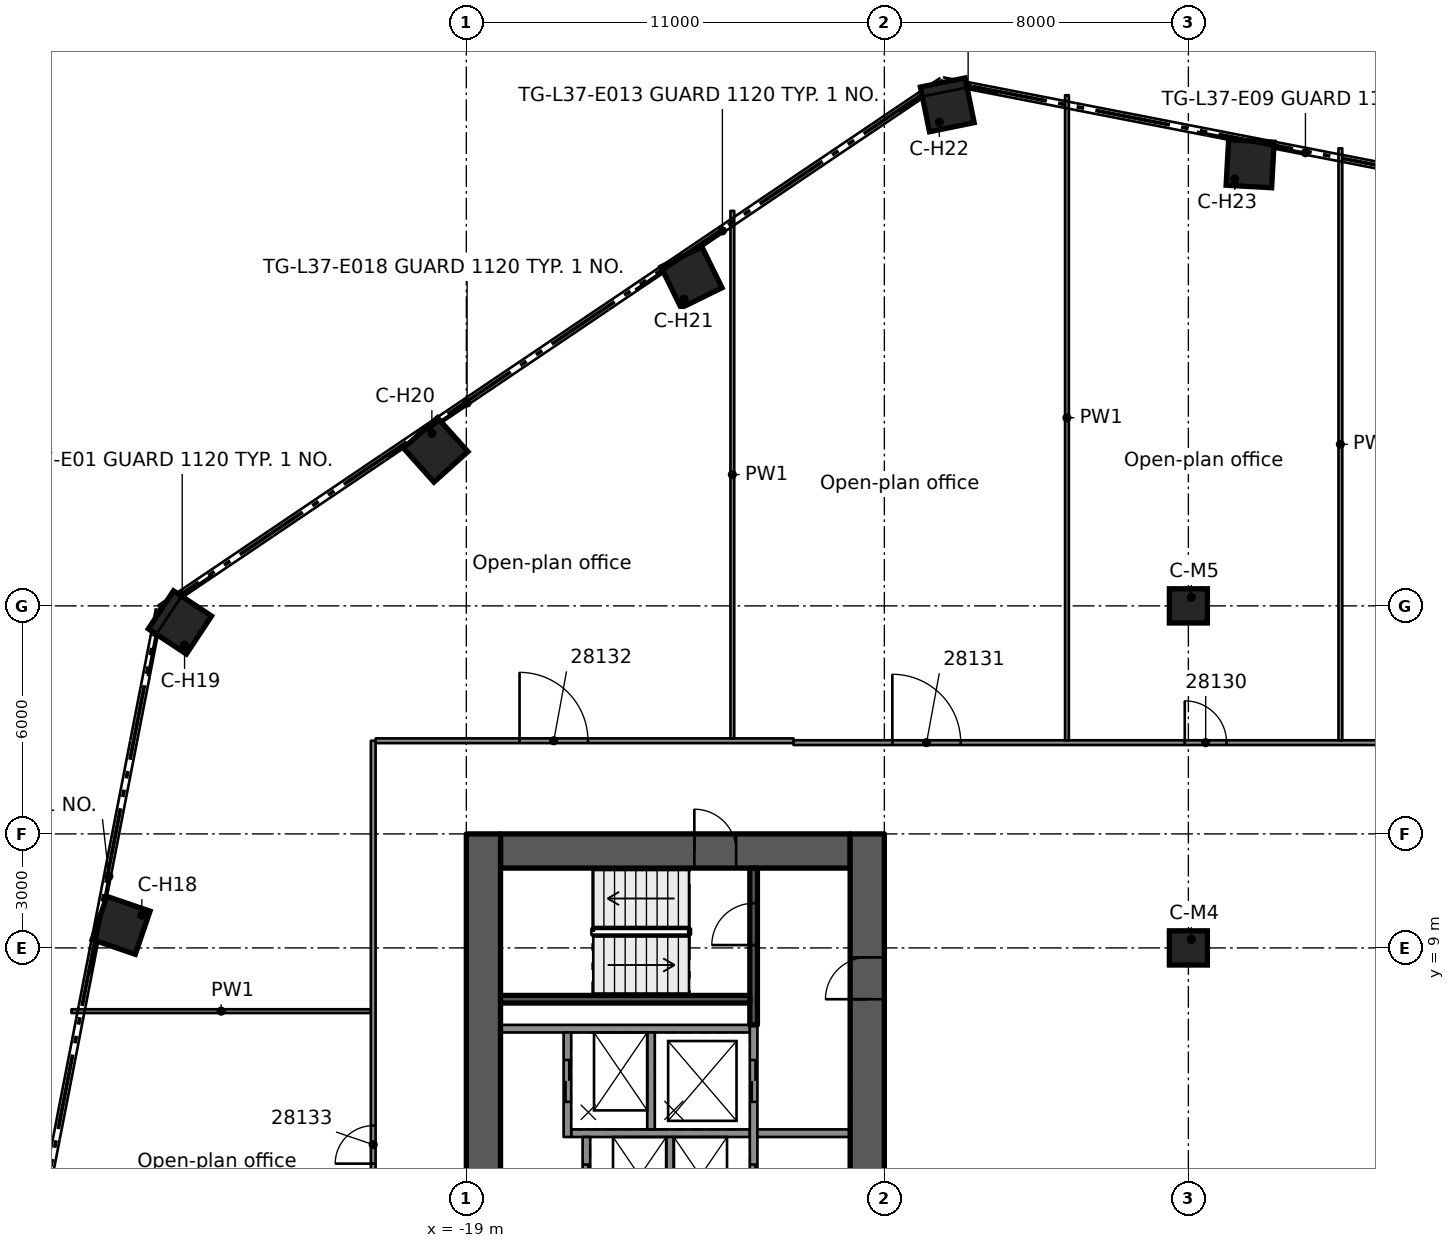
"""IFC4 building model, lengths in metres.
Left out: names, types, materials, properties, quantities, classifications, styles, units other than length and angle.
Written with IfcOpenShell. Run it as: python <this file> out.ifc"""

import sys

from ifc_helpers import new_model, si_unit, direction, frame, frame_2d, origin, origin_2d, place, context, subcontext, project, spatial, rectangle, extrude, element, fill, save


model = new_model("IFC4")
c1 = context("Model", 3, precision=1e-05, world=origin(), true_north=direction((0.0, 1.0)))
c2 = subcontext(c1, "Body", "Model", "MODEL_VIEW")
j1 = project(units=[si_unit("LENGTHUNIT", "METRE"), si_unit("PLANEANGLEUNIT", "RADIAN")], contexts=[c1])
p1 = place(None, origin())
s1 = spatial("IfcSite", under=j1, at=p1, CompositionType="ELEMENT")
p2 = place(p1, origin())
s2 = spatial("IfcBuilding", under=s1, at=p2, CompositionType="ELEMENT")
p3 = place(p2, frame((0.0, 0.0, 145.6)))
s3 = spatial("IfcBuildingStorey", under=s2, at=p3, CompositionType="ELEMENT", Elevation=145.6)
p4 = place(p3, frame((-18.1, 11.55, 0.0), z_axis=(0.0, 0.0, 1.0), x_axis=(1.0, 0.0, 0.0)))
e1 = element("IfcWall", 1, at=p4, inside=s3, PredefinedType="SHEAR", context=c2, shape_type="SweptSolid", body=[
    extrude(rectangle(XDim=9.2, YDim=0.9, at=frame_2d((4.6, 0.0))), origin(), (0.0, 0.0, 1.0), 3.5),
])
p5 = place(p4, frame((5.1, 0.0, 0.0)))
e2 = element("IfcOpeningElement", 2, at=p5, cuts=e1, PredefinedType="OPENING", context=c2, shape_type="SweptSolid", body=[
    extrude(rectangle(XDim=1.1, YDim=2.1, at=frame_2d((0.55, 1.05))), frame((0.0, 0.46, 0.0), z_axis=(0.0, -1.0, 0.0), x_axis=(1.0, 0.0, 0.0)), (0.0, 0.0, 1.0), 0.92),
])
p6 = place(p3, frame((-18.55, -12.0, 0.0), z_axis=(0.0, 0.0, 1.0), x_axis=(0.0, 1.0, 0.0)))
e3 = element("IfcWall", 3, at=p6, inside=s3, PredefinedType="SHEAR", context=c2, shape_type="SweptSolid", body=[
    extrude(rectangle(XDim=24.0, YDim=0.9, at=frame_2d((12.0, 0.0))), origin(), (0.0, 0.0, 1.0), 3.5),
])
p7 = place(p6, frame((10.1, 0.0, 0.0)))
e4 = element("IfcOpeningElement", 4, at=p7, cuts=e3, PredefinedType="OPENING", context=c2, shape_type="SweptSolid", body=[
    extrude(rectangle(XDim=1.8, YDim=2.1, at=frame_2d((0.9, 1.05))), frame((0.0, 0.46, 0.0), z_axis=(0.0, -1.0, 0.0), x_axis=(1.0, 0.0, 0.0)), (0.0, 0.0, 1.0), 0.92),
])
p8 = place(p3, frame((-8.45, -12.0, 0.0), z_axis=(0.0, 0.0, 1.0), x_axis=(0.0, 1.0, 0.0)))
e5 = element("IfcWall", 5, at=p8, inside=s3, PredefinedType="SHEAR", context=c2, shape_type="SweptSolid", body=[
    extrude(rectangle(XDim=24.0, YDim=0.9, at=frame_2d((12.0, 0.0))), origin(), (0.0, 0.0, 1.0), 3.5),
])
p9 = place(p8, frame((9.6, 0.0, 0.0)))
e6 = element("IfcOpeningElement", 6, at=p9, cuts=e5, PredefinedType="OPENING", context=c2, shape_type="SweptSolid", body=[
    extrude(rectangle(XDim=1.8, YDim=2.1, at=frame_2d((0.9, 1.05))), frame((0.0, 0.46, 0.0), z_axis=(0.0, -1.0, 0.0), x_axis=(1.0, 0.0, 0.0)), (0.0, 0.0, 1.0), 0.92),
])
p10 = place(p8, frame((19.65, 0.0, 0.0)))
e7 = element("IfcOpeningElement", 7, at=p10, cuts=e5, PredefinedType="OPENING", context=c2, shape_type="SweptSolid", body=[
    extrude(rectangle(XDim=1.1, YDim=2.1, at=frame_2d((0.55, 1.05))), frame((0.0, 0.46, 0.0), z_axis=(0.0, -1.0, 0.0), x_axis=(1.0, 0.0, 0.0)), (0.0, 0.0, 1.0), 0.92),
])
for number, where, z_axis, x_axis in (
    (8, (-28.085, 9.594, 0.0), (0.0, 0.0, 1.0), (-0.946, 0.323, 0.0)),
    (9, (-26.536, 17.564, 0.0), (0.0, 0.0, 1.0), (-0.834, 0.552, 0.0)),
    (10, (-19.806, 22.104, 0.0), (0.0, 0.0, 1.0), (-0.667, 0.745, 0.0)),
    (11, (-13.075, 26.644, 0.0), (0.0, 0.0, 1.0), (-0.441, 0.898, 0.0)),
    (12, (-6.344, 31.183, 0.0), (0.0, 0.0, 1.0), (-0.199, 0.98, 0.0)),
    (13, (1.625, 29.634, 0.0), (0.0, 0.0, 1.0), (0.055, 0.998, 0.0)),
):
    element("IfcColumn", number, at=place(p3, frame(where, z_axis=z_axis, x_axis=x_axis)), inside=s3, PredefinedType="COLUMN", context=c2, shape_type="SweptSolid", body=[
        extrude(rectangle(XDim=1.2, YDim=1.2, at=origin_2d()), origin(), (0.0, 0.0, 1.0), 3.5),
    ])
for number, where, z_axis, x_axis in (
    (14, (0.0, 9.0, 0.0), (0.0, 0.0, 1.0), (1.0, 0.0, 0.0)),
    (15, (0.0, 18.0, 0.0), (0.0, 0.0, 1.0), (1.0, 0.0, 0.0)),
):
    element("IfcColumn", number, at=place(p3, frame(where, z_axis=z_axis, x_axis=x_axis)), inside=s3, PredefinedType="COLUMN", context=c2, shape_type="SweptSolid", body=[
        extrude(rectangle(XDim=1.0, YDim=0.9, at=origin_2d()), origin(), (0.0, 0.0, 1.0), 3.5),
    ])
p11 = place(p3, frame((-11.54, 6.875, 0.0), z_axis=(0.0, 0.0, 1.0), x_axis=(-1.0, 0.0, 0.0)))
e16 = element("IfcWall", 16, at=p11, inside=s3, PredefinedType="SOLIDWALL", context=c2, shape_type="SweptSolid", body=[
    extrude(rectangle(XDim=6.56, YDim=0.2, at=frame_2d((3.28, 0.0))), origin(), (0.0, 0.0, 1.0), 3.09),
])
p12 = place(p3, frame((-11.54, 4.125, 0.0), z_axis=(0.0, 0.0, 1.0), x_axis=(-1.0, 0.0, 0.0)))
e17 = element("IfcWall", 17, at=p12, inside=s3, PredefinedType="SOLIDWALL", context=c2, shape_type="SweptSolid", body=[
    extrude(rectangle(XDim=4.7, YDim=0.2, at=frame_2d((2.35, 0.0))), origin(), (0.0, 0.0, 1.0), 3.09),
])
p13 = place(p3, frame((-11.44, -6.975, 0.0), z_axis=(0.0, 0.0, 1.0), x_axis=(0.0, 1.0, 0.0)))
e18 = element("IfcWall", 18, at=p13, inside=s3, PredefinedType="SOLIDWALL", context=c2, shape_type="SweptSolid", body=[
    extrude(rectangle(XDim=13.95, YDim=0.2, at=frame_2d((6.975, 0.0))), origin(), (0.0, 0.0, 1.0), 3.09),
])
p14 = place(p13, frame((9.175, 0.0, 0.0)))
e19 = element("IfcOpeningElement", 19, at=p14, cuts=e18, PredefinedType="OPENING", context=c2, shape_type="SweptSolid", body=[
    extrude(rectangle(XDim=1.1, YDim=2.1, at=frame_2d((0.55, 1.05))), frame((0.0, 0.11, 0.0), z_axis=(0.0, -1.0, 0.0), x_axis=(1.0, 0.0, 0.0)), (0.0, 0.0, 1.0), 0.22),
])
p15 = place(p13, frame((11.925, 0.0, 0.0)))
e20 = element("IfcOpeningElement", 20, at=p15, cuts=e18, PredefinedType="OPENING", context=c2, shape_type="SweptSolid", body=[
    extrude(rectangle(XDim=1.1, YDim=2.1, at=frame_2d((0.55, 1.05))), frame((0.0, 0.11, 0.0), z_axis=(0.0, -1.0, 0.0), x_axis=(1.0, 0.0, 0.0)), (0.0, 0.0, 1.0), 0.22),
])
p16 = place(p13, frame((1.075, 0.0, 0.0)))
e21 = element("IfcOpeningElement", 21, at=p16, cuts=e18, PredefinedType="OPENING", context=c2, shape_type="SweptSolid", body=[
    extrude(rectangle(XDim=0.8, YDim=2.1, at=frame_2d((0.4, 1.05))), frame((0.0, 0.11, 0.0), z_axis=(0.0, -1.0, 0.0), x_axis=(1.0, 0.0, 0.0)), (0.0, 0.0, 1.0), 0.22),
])
for number, where, z_axis, x_axis in (
    (22, (-13.64, 1.475, 0.0), (0.0, 0.0, 1.0), (0.0, 1.0, 0.0)),
    (23, (-14.14, 4.225, 0.0), (0.0, 0.0, 1.0), (0.0, 1.0, 0.0)),
):
    element("IfcWall", number, at=place(p3, frame(where, z_axis=z_axis, x_axis=x_axis)), inside=s3, PredefinedType="SOLIDWALL", context=c2, shape_type="SweptSolid", body=[
        extrude(rectangle(XDim=2.55, YDim=0.2, at=frame_2d((1.275, 0.0))), origin(), (0.0, 0.0, 1.0), 3.09),
    ])
p17 = place(p3, frame((-15.84, -4.025, 0.0), z_axis=(0.0, 0.0, 1.0), x_axis=(0.0, 1.0, 0.0)))
e24 = element("IfcWall", 24, at=p17, inside=s3, PredefinedType="SOLIDWALL", context=c2, shape_type="SweptSolid", body=[
    extrude(rectangle(XDim=8.05, YDim=0.2, at=frame_2d((4.025, 0.0))), origin(), (0.0, 0.0, 1.0), 3.09),
])
p18 = place(p17, frame((3.475, 0.0, 0.0)))
e25 = element("IfcOpeningElement", 25, at=p18, cuts=e24, PredefinedType="OPENING", context=c2, shape_type="SweptSolid", body=[
    extrude(rectangle(XDim=1.1, YDim=2.1, at=frame_2d((0.55, 1.05))), frame((0.0, 0.11, 0.0), z_axis=(0.0, -1.0, 0.0), x_axis=(1.0, 0.0, 0.0)), (0.0, 0.0, 1.0), 0.22),
])
p19 = place(p17, frame((6.225, 0.0, 0.0)))
e26 = element("IfcOpeningElement", 26, at=p19, cuts=e24, PredefinedType="OPENING", context=c2, shape_type="SweptSolid", body=[
    extrude(rectangle(XDim=1.1, YDim=2.1, at=frame_2d((0.55, 1.05))), frame((0.0, 0.11, 0.0), z_axis=(0.0, -1.0, 0.0), x_axis=(1.0, 0.0, 0.0)), (0.0, 0.0, 1.0), 0.22),
])
p20 = place(p3, frame((-16.34, 4.025, 0.0), z_axis=(0.0, 0.0, 1.0), x_axis=(0.0, 1.0, 0.0)))
e27 = element("IfcWall", 27, at=p20, inside=s3, PredefinedType="SOLIDWALL", context=c2, shape_type="SweptSolid", body=[
    extrude(rectangle(XDim=2.75, YDim=0.2, at=frame_2d((1.375, 0.0))), origin(), (0.0, 0.0, 1.0), 3.09),
])
p21 = place(p20, frame((0.925, 0.0, 0.0)))
e28 = element("IfcOpeningElement", 28, at=p21, cuts=e27, PredefinedType="OPENING", context=c2, shape_type="SweptSolid", body=[
    extrude(rectangle(XDim=1.1, YDim=2.1, at=frame_2d((0.55, 1.05))), frame((0.0, 0.11, 0.0), z_axis=(0.0, -1.0, 0.0), x_axis=(1.0, 0.0, 0.0)), (0.0, 0.0, 1.0), 0.22),
])
p22 = place(p3, frame((-11.44, 6.975, 0.0), z_axis=(0.0, 0.0, 1.0), x_axis=(0.0, 1.0, 0.0)))
e29 = element("IfcWall", 29, at=p22, inside=s3, PredefinedType="SOLIDWALL", context=c2, shape_type="SweptSolid", body=[
    extrude(rectangle(XDim=4.125, YDim=0.2, at=frame_2d((2.062, 0.0))), origin(), (0.0, 0.0, 1.0), 3.09),
])
p23 = place(p22, frame((2.1, 0.0, 0.0)))
e30 = element("IfcOpeningElement", 30, at=p23, cuts=e29, PredefinedType="OPENING", context=c2, shape_type="SweptSolid", body=[
    extrude(rectangle(XDim=1.1, YDim=2.1, at=frame_2d((0.55, 1.05))), frame((0.0, 0.11, 0.0), z_axis=(0.0, -1.0, 0.0), x_axis=(1.0, 0.0, 0.0)), (0.0, 0.0, 1.0), 0.22),
])
p24 = place(p3, frame((-11.54, 7.65, 0.0), z_axis=(0.0, 0.0, 1.0), x_axis=(-1.0, 0.0, 0.0)))
e31 = element("IfcWall", 31, at=p24, inside=s3, PredefinedType="SOLIDWALL", context=c2, shape_type="SweptSolid", body=[
    extrude(rectangle(XDim=6.56, YDim=0.2, at=frame_2d((3.28, 0.0))), origin(), (0.0, 0.0, 1.0), 3.09),
])
p25 = place(p3, frame((-8.9, 4.125, 0.0), z_axis=(0.0, 0.0, 1.0), x_axis=(-1.0, 0.0, 0.0)))
e32 = element("IfcWall", 32, at=p25, inside=s3, PredefinedType="PARTITIONING", context=c2, shape_type="SweptSolid", body=[
    extrude(rectangle(XDim=2.44, YDim=0.2, at=frame_2d((1.22, 0.0))), origin(), (0.0, 0.0, 1.0), 3.09),
])
p26 = place(p3, frame((-29.39, 7.336, 0.0), z_axis=(0.0, 0.0, 1.0), x_axis=(1.0, 0.0, 0.0)))
e33 = element("IfcWall", 33, at=p26, inside=s3, PredefinedType="PARTITIONING", context=c2, shape_type="SweptSolid", body=[
    extrude(rectangle(XDim=7.878, YDim=0.1, at=frame_2d((3.939, 0.0))), origin(), (0.0, 0.0, 1.0), 3.08),
])
p27 = place(p3, frame((-10.39, 14.401, 0.0), z_axis=(0.0, 0.0, 1.0), x_axis=(1.0, 0.0, 0.0)))
e34 = element("IfcWall", 34, at=p27, inside=s3, PredefinedType="PARTITIONING", context=c2, shape_type="SweptSolid", body=[
    extrude(rectangle(XDim=20.781, YDim=0.125, at=frame_2d((10.391, 0.0))), origin(), (0.0, 0.0, 1.0), 3.08),
])
p28 = place(p27, frame((10.295, 0.0, 0.0)))
e35 = element("IfcOpeningElement", 35, at=p28, cuts=e34, PredefinedType="OPENING", context=c2, shape_type="SweptSolid", body=[
    extrude(rectangle(XDim=1.1, YDim=2.1, at=frame_2d((0.55, 1.05))), frame((0.0, 0.073, 0.0), z_axis=(0.0, -1.0, 0.0), x_axis=(1.0, 0.0, 0.0)), (0.0, 0.0, 1.0), 0.145),
])
p29 = place(p27, frame((2.6, 0.0, 0.0)))
e36 = element("IfcOpeningElement", 36, at=p29, cuts=e34, PredefinedType="OPENING", context=c2, shape_type="SweptSolid", body=[
    extrude(rectangle(XDim=1.8, YDim=2.1, at=frame_2d((0.9, 1.05))), frame((0.0, 0.073, 0.0), z_axis=(0.0, -1.0, 0.0), x_axis=(1.0, 0.0, 0.0)), (0.0, 0.0, 1.0), 0.145),
])
p30 = place(p3, frame((-21.387, 14.451, 0.0), z_axis=(0.0, 0.0, 1.0), x_axis=(1.0, 0.0, 0.0)))
e37 = element("IfcWall", 37, at=p30, inside=s3, PredefinedType="PARTITIONING", context=c2, shape_type="SweptSolid", body=[
    extrude(rectangle(XDim=10.996, YDim=0.125, at=frame_2d((5.498, 0.0))), origin(), (0.0, 0.0, 1.0), 3.08),
])
p31 = place(p30, frame((3.788, 0.0, 0.0)))
e38 = element("IfcOpeningElement", 38, at=p31, cuts=e37, PredefinedType="OPENING", context=c2, shape_type="SweptSolid", body=[
    extrude(rectangle(XDim=1.8, YDim=2.1, at=frame_2d((0.9, 1.05))), frame((0.0, 0.073, 0.0), z_axis=(0.0, -1.0, 0.0), x_axis=(1.0, 0.0, 0.0)), (0.0, 0.0, 1.0), 0.145),
])
p32 = place(p3, frame((4.0, 14.463, 0.0), z_axis=(0.0, 0.0, 1.0), x_axis=(0.0, 1.0, 0.0)))
e39 = element("IfcWall", 39, at=p32, inside=s3, PredefinedType="PARTITIONING", context=c2, shape_type="SweptSolid", body=[
    extrude(rectangle(XDim=15.576, YDim=0.1, at=frame_2d((7.788, 0.0))), origin(), (0.0, 0.0, 1.0), 3.08),
])
p33 = place(p3, frame((-3.195, 14.463, 0.0), z_axis=(0.0, 0.0, 1.0), x_axis=(0.0, 1.0, 0.0)))
e40 = element("IfcWall", 40, at=p33, inside=s3, PredefinedType="PARTITIONING", context=c2, shape_type="SweptSolid", body=[
    extrude(rectangle(XDim=16.974, YDim=0.1, at=frame_2d((8.487, 0.0))), origin(), (0.0, 0.0, 1.0), 3.08),
])
p34 = place(p3, frame((-12.0, 14.514, 0.0), z_axis=(0.0, 0.0, 1.0), x_axis=(0.0, 1.0, 0.0)))
e41 = element("IfcWall", 41, at=p34, inside=s3, PredefinedType="PARTITIONING", context=c2, shape_type="SweptSolid", body=[
    extrude(rectangle(XDim=13.88, YDim=0.1, at=frame_2d((6.94, 0.0))), origin(), (0.0, 0.0, 1.0), 3.08),
])
p35 = place(p3, frame((-21.45, -14.445, 0.0), z_axis=(0.0, 0.0, 1.0), x_axis=(0.0, 1.0, 0.0)))
e42 = element("IfcWall", 42, at=p35, inside=s3, PredefinedType="PARTITIONING", context=c2, shape_type="SweptSolid", body=[
    extrude(rectangle(XDim=28.896, YDim=0.125, at=frame_2d((14.448, 0.0))), origin(), (0.0, 0.0, 1.0), 3.08),
])
p36 = place(p35, frame((7.045, 0.0, 0.0)))
e43 = element("IfcOpeningElement", 43, at=p36, cuts=e42, PredefinedType="OPENING", context=c2, shape_type="SweptSolid", body=[
    extrude(rectangle(XDim=0.9, YDim=2.1, at=frame_2d((0.45, 1.05))), frame((0.0, 0.073, 0.0), z_axis=(0.0, -1.0, 0.0), x_axis=(1.0, 0.0, 0.0)), (0.0, 0.0, 1.0), 0.145),
])
p37 = place(p35, frame((17.769, 0.0, 0.0)))
e44 = element("IfcOpeningElement", 44, at=p37, cuts=e42, PredefinedType="OPENING", context=c2, shape_type="SweptSolid", body=[
    extrude(rectangle(XDim=1.0, YDim=2.1, at=frame_2d((0.5, 1.05))), frame((0.0, 0.073, 0.0), z_axis=(0.0, -1.0, 0.0), x_axis=(1.0, 0.0, 0.0)), (0.0, 0.0, 1.0), 0.145),
])
p38 = place(p14, origin())
e45 = element("IfcDoor", 45, at=p38, inside=s3, OperationType="DOUBLE_DOOR_SLIDING", PredefinedType="DOOR", context=c2, shape_type="SweptSolid", body=[
    extrude(rectangle(XDim=1.1, YDim=2.1, at=frame_2d((0.55, 1.05))), frame((0.0, 0.025, 0.0), z_axis=(0.0, -1.0, 0.0), x_axis=(1.0, 0.0, 0.0)), (0.0, 0.0, 1.0), 0.05),
])
fill(e19, e45)
p39 = place(p19, origin())
e46 = element("IfcDoor", 46, at=p39, inside=s3, OperationType="DOUBLE_DOOR_SLIDING", PredefinedType="DOOR", context=c2, shape_type="SweptSolid", body=[
    extrude(rectangle(XDim=1.1, YDim=2.1, at=frame_2d((0.55, 1.05))), frame((0.0, 0.025, 0.0), z_axis=(0.0, -1.0, 0.0), x_axis=(1.0, 0.0, 0.0)), (0.0, 0.0, 1.0), 0.05),
])
fill(e26, e46)
p40 = place(p15, origin())
e47 = element("IfcDoor", 47, at=p40, inside=s3, OperationType="DOUBLE_DOOR_SLIDING", PredefinedType="DOOR", context=c2, shape_type="SweptSolid", body=[
    extrude(rectangle(XDim=1.1, YDim=2.1, at=frame_2d((0.55, 1.05))), frame((0.0, 0.025, 0.0), z_axis=(0.0, -1.0, 0.0), x_axis=(1.0, 0.0, 0.0)), (0.0, 0.0, 1.0), 0.05),
])
fill(e20, e47)
p41 = place(p21, origin())
e48 = element("IfcDoor", 48, at=p41, inside=s3, OperationType="DOUBLE_DOOR_SLIDING", PredefinedType="DOOR", context=c2, shape_type="SweptSolid", body=[
    extrude(rectangle(XDim=1.1, YDim=2.1, at=frame_2d((0.55, 1.05))), frame((0.0, 0.025, 0.0), z_axis=(0.0, -1.0, 0.0), x_axis=(1.0, 0.0, 0.0)), (0.0, 0.0, 1.0), 0.05),
])
fill(e28, e48)
p42 = place(p10, origin())
e49 = element("IfcDoor", 49, at=p42, inside=s3, OperationType="SINGLE_SWING_RIGHT", PredefinedType="DOOR", context=c2, shape_type="SweptSolid", body=[
    extrude(rectangle(XDim=1.1, YDim=2.1, at=frame_2d((0.55, 1.05))), frame((0.0, 0.025, 0.0), z_axis=(0.0, -1.0, 0.0), x_axis=(1.0, 0.0, 0.0)), (0.0, 0.0, 1.0), 0.05),
])
fill(e7, e49)
p43 = place(p5, origin())
e50 = element("IfcDoor", 50, at=p43, inside=s3, OperationType="SINGLE_SWING_RIGHT", PredefinedType="DOOR", context=c2, shape_type="SweptSolid", body=[
    extrude(rectangle(XDim=1.1, YDim=2.1, at=frame_2d((0.55, 1.05))), frame((0.0, 0.025, 0.0), z_axis=(0.0, -1.0, 0.0), x_axis=(1.0, 0.0, 0.0)), (0.0, 0.0, 1.0), 0.05),
])
fill(e2, e50)
p44 = place(p23, origin())
e51 = element("IfcDoor", 51, at=p44, inside=s3, OperationType="SINGLE_SWING_RIGHT", PredefinedType="DOOR", context=c2, shape_type="SweptSolid", body=[
    extrude(rectangle(XDim=1.1, YDim=2.1, at=frame_2d((0.55, 1.05))), frame((0.0, 0.025, 0.0), z_axis=(0.0, -1.0, 0.0), x_axis=(1.0, 0.0, 0.0)), (0.0, 0.0, 1.0), 0.05),
])
fill(e30, e51)
p45 = place(p28, origin())
e52 = element("IfcDoor", 52, at=p45, inside=s3, OperationType="SINGLE_SWING_RIGHT", PredefinedType="DOOR", context=c2, shape_type="SweptSolid", body=[
    extrude(rectangle(XDim=1.1, YDim=2.1, at=frame_2d((0.55, 1.05))), frame((0.0, 0.025, 0.0), z_axis=(0.0, -1.0, 0.0), x_axis=(1.0, 0.0, 0.0)), (0.0, 0.0, 1.0), 0.05),
])
fill(e35, e52)
p46 = place(p29, origin())
e53 = element("IfcDoor", 53, at=p46, inside=s3, OperationType="DOUBLE_DOOR_SINGLE_SWING", PredefinedType="DOOR", context=c2, shape_type="SweptSolid", body=[
    extrude(rectangle(XDim=1.8, YDim=2.1, at=frame_2d((0.9, 1.05))), frame((0.0, 0.025, 0.0), z_axis=(0.0, -1.0, 0.0), x_axis=(1.0, 0.0, 0.0)), (0.0, 0.0, 1.0), 0.05),
])
fill(e36, e53)
p47 = place(p31, origin())
e54 = element("IfcDoor", 54, at=p47, inside=s3, OperationType="DOUBLE_DOOR_SINGLE_SWING", PredefinedType="DOOR", context=c2, shape_type="SweptSolid", body=[
    extrude(rectangle(XDim=1.8, YDim=2.1, at=frame_2d((0.9, 1.05))), frame((0.0, 0.025, 0.0), z_axis=(0.0, -1.0, 0.0), x_axis=(1.0, 0.0, 0.0)), (0.0, 0.0, 1.0), 0.05),
])
fill(e38, e54)
p48 = place(p37, origin())
e55 = element("IfcDoor", 55, at=p48, inside=s3, OperationType="SINGLE_SWING_RIGHT", PredefinedType="DOOR", context=c2, shape_type="SweptSolid", body=[
    extrude(rectangle(XDim=1.0, YDim=2.1, at=frame_2d((0.5, 1.05))), frame((0.0, 0.025, 0.0), z_axis=(0.0, -1.0, 0.0), x_axis=(1.0, 0.0, 0.0)), (0.0, 0.0, 1.0), 0.05),
])
fill(e44, e55)
save(model, sys.argv[1])
